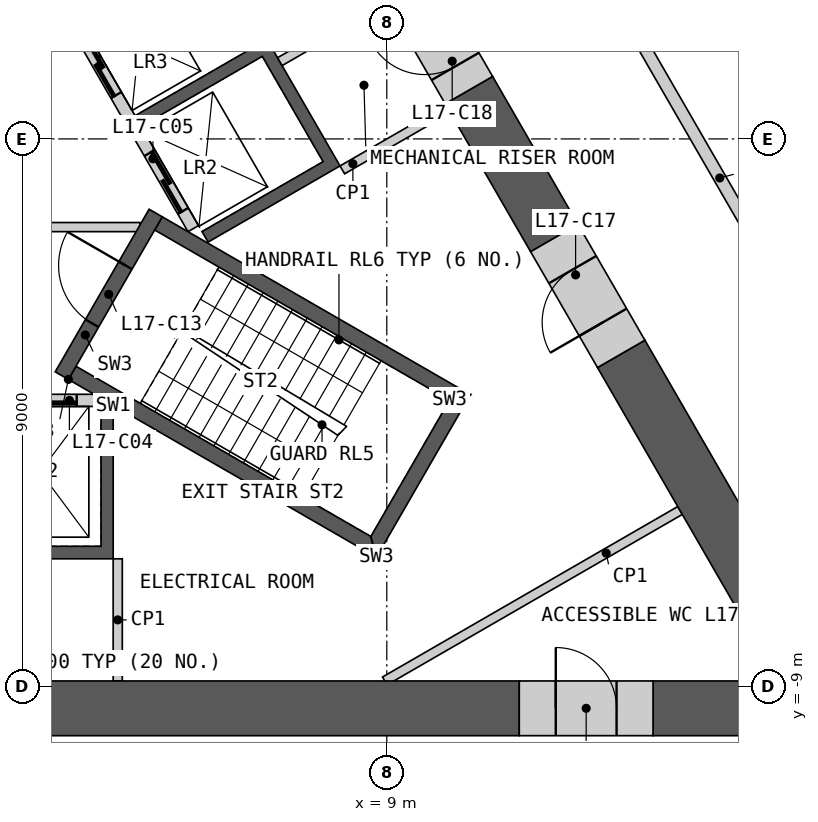
"""IFC4 building model, lengths in metres.
Left out: names, types, materials, properties, quantities, classifications, styles, units other than length and angle.
Written with IfcOpenShell. Run it as: python <this file> out.ifc"""

import sys

from ifc_helpers import new_model, si_unit, direction, frame, frame_2d, origin, place, context, subcontext, project, spatial, polyline, rectangle, outline, extrude, element, fill, save


model = new_model("IFC4")
c1 = context("Model", 3, precision=1e-05, world=origin(), true_north=direction((0.0, 1.0)))
c2 = subcontext(c1, "Body", "Model", "MODEL_VIEW")
j1 = project(units=[si_unit("LENGTHUNIT", "METRE"), si_unit("PLANEANGLEUNIT", "RADIAN")], contexts=[c1])
p1 = place(None, origin())
s1 = spatial("IfcSite", under=j1, at=p1, CompositionType="ELEMENT")
p2 = place(p1, origin())
s2 = spatial("IfcBuilding", under=s1, at=p2, CompositionType="ELEMENT")
p3 = place(p2, frame((0.0, 0.0, 80.4)))
s3 = spatial("IfcBuildingStorey", under=s2, at=p3, CompositionType="ELEMENT", Elevation=80.4)
p4 = place(p3, origin())
e1 = element("IfcWall", 1, at=p4, inside=s3, PredefinedType="SHEAR", context=c2, shape_type="SweptSolid", body=[
    extrude(outline(polyline([(4.5, -4.4), (4.5, -6.906), (-4.5, -6.906), (-4.5, -4.4), (-4.3, -4.4), (-4.3, -6.7), (-2.3, -6.7), (-2.3, -4.4), (-2.1, -4.4), (-2.1, -6.7), (-0.1, -6.7), (-0.1, -4.4), (0.1, -4.4), (0.1, -6.7), (2.1, -6.7), (2.1, -4.4), (2.3, -4.4), (2.3, -6.7), (4.3, -6.7), (4.3, -4.4), (4.5, -4.4)])), origin(), (0.0, 0.0, 1.0), 3.8),
])
p5 = place(p3, frame((-4.187, -4.3, 0.0), z_axis=(0.0, 0.0, 1.0), x_axis=(1.0, 0.0, 0.0)))
e2 = element("IfcWall", 2, at=p5, inside=s3, PredefinedType="SOLIDWALL", context=c2, shape_type="SweptSolid", body=[
    extrude(rectangle(XDim=8.373, YDim=0.2, at=frame_2d((4.187, 0.0))), origin(), (0.0, 0.0, 1.0), 3.8),
])
p6 = place(p5, frame((0.287, 0.0, 0.0)))
e3 = element("IfcOpeningElement", 3, at=p6, cuts=e2, PredefinedType="OPENING", context=c2, shape_type="SweptSolid", body=[
    extrude(rectangle(XDim=1.2, YDim=2.1, at=frame_2d((0.6, 1.05))), frame((0.0, 0.11, 0.0), z_axis=(0.0, -1.0, 0.0), x_axis=(1.0, 0.0, 0.0)), (0.0, 0.0, 1.0), 0.22),
])
p7 = place(p5, frame((2.387, 0.0, 0.0)))
e4 = element("IfcOpeningElement", 4, at=p7, cuts=e2, PredefinedType="OPENING", context=c2, shape_type="SweptSolid", body=[
    extrude(rectangle(XDim=1.4, YDim=2.1, at=frame_2d((0.7, 1.05))), frame((0.0, 0.11, 0.0), z_axis=(0.0, -1.0, 0.0), x_axis=(1.0, 0.0, 0.0)), (0.0, 0.0, 1.0), 0.22),
])
p8 = place(p5, frame((4.737, 0.0, 0.0)))
e5 = element("IfcOpeningElement", 5, at=p8, cuts=e2, PredefinedType="OPENING", context=c2, shape_type="SweptSolid", body=[
    extrude(rectangle(XDim=1.1, YDim=2.1, at=frame_2d((0.55, 1.05))), frame((0.0, 0.11, 0.0), z_axis=(0.0, -1.0, 0.0), x_axis=(1.0, 0.0, 0.0)), (0.0, 0.0, 1.0), 0.22),
])
p9 = place(p5, frame((6.887, 0.0, 0.0)))
e6 = element("IfcOpeningElement", 6, at=p9, cuts=e2, PredefinedType="OPENING", context=c2, shape_type="SweptSolid", body=[
    extrude(rectangle(XDim=1.2, YDim=2.1, at=frame_2d((0.6, 1.05))), frame((0.0, 0.11, 0.0), z_axis=(0.0, -1.0, 0.0), x_axis=(1.0, 0.0, 0.0)), (0.0, 0.0, 1.0), 0.22),
])
p10 = place(p3, origin())
e7 = element("IfcWall", 7, at=p10, inside=s3, PredefinedType="SHEAR", context=c2, shape_type="SweptSolid", body=[
    extrude(outline(polyline([(2.66, 4.192), (4.831, 5.445), (8.231, -0.444), (6.061, -1.697), (5.96, -1.524), (7.952, -0.374), (6.952, 1.358), (4.96, 0.208), (4.861, 0.381), (6.852, 1.531), (5.852, 3.263), (3.861, 2.113), (3.76, 2.287), (5.752, 3.437), (4.752, 5.169), (2.76, 4.019), (2.66, 4.192)])), origin(), (0.0, 0.0, 1.0), 3.8),
])
p11 = place(p3, frame((5.817, -1.476, 0.0), z_axis=(0.0, 0.0, 1.0), x_axis=(-0.500002616675, 0.866023893041, 0.0)))
e8 = element("IfcWall", 8, at=p11, inside=s3, PredefinedType="SOLIDWALL", context=c2, shape_type="SweptSolid", body=[
    extrude(rectangle(XDim=8.373, YDim=0.2, at=frame_2d((4.187, 0.0))), origin(), (0.0, 0.0, 1.0), 3.8),
])
p12 = place(p11, frame((0.337, 0.0, 0.0)))
e9 = element("IfcOpeningElement", 9, at=p12, cuts=e8, PredefinedType="OPENING", context=c2, shape_type="SweptSolid", body=[
    extrude(rectangle(XDim=1.1, YDim=2.1, at=frame_2d((0.55, 1.05))), frame((0.0, 0.11, 0.0), z_axis=(0.0, -1.0, 0.0), x_axis=(1.0, 0.0, 0.0)), (0.0, 0.0, 1.0), 0.22),
])
p13 = place(p11, frame((2.537, 0.0, 0.0)))
e10 = element("IfcOpeningElement", 10, at=p13, cuts=e8, PredefinedType="OPENING", context=c2, shape_type="SweptSolid", body=[
    extrude(rectangle(XDim=1.1, YDim=2.1, at=frame_2d((0.55, 1.05))), frame((0.0, 0.11, 0.0), z_axis=(0.0, -1.0, 0.0), x_axis=(1.0, 0.0, 0.0)), (0.0, 0.0, 1.0), 0.22),
])
p14 = place(p11, frame((4.737, 0.0, 0.0)))
e11 = element("IfcOpeningElement", 11, at=p14, cuts=e8, PredefinedType="OPENING", context=c2, shape_type="SweptSolid", body=[
    extrude(rectangle(XDim=1.1, YDim=2.1, at=frame_2d((0.55, 1.05))), frame((0.0, 0.11, 0.0), z_axis=(0.0, -1.0, 0.0), x_axis=(1.0, 0.0, 0.0)), (0.0, 0.0, 1.0), 0.22),
])
p15 = place(p11, frame((7.037, 0.0, 0.0)))
e12 = element("IfcOpeningElement", 12, at=p15, cuts=e8, PredefinedType="OPENING", context=c2, shape_type="SweptSolid", body=[
    extrude(rectangle(XDim=0.9, YDim=2.1, at=frame_2d((0.45, 1.05))), frame((0.0, 0.11, 0.0), z_axis=(0.0, -1.0, 0.0), x_axis=(1.0, 0.0, 0.0)), (0.0, 0.0, 1.0), 0.22),
])
p16 = place(p3, frame((-4.941, -1.45, 0.0), z_axis=(0.0, 0.0, 1.0), x_axis=(1.0, 0.0, 0.0)))
e13 = element("IfcWall", 13, at=p16, inside=s3, PredefinedType="PARTITIONING", context=c2, shape_type="SweptSolid", body=[
    extrude(rectangle(XDim=9.882, YDim=0.15, at=frame_2d((4.941, 0.0))), origin(), (0.0, 0.0, 1.0), 3.8),
])
p17 = place(p16, frame((4.391, 0.0, 0.0)))
e14 = element("IfcOpeningElement", 14, at=p17, cuts=e13, PredefinedType="OPENING", context=c2, shape_type="SweptSolid", body=[
    extrude(rectangle(XDim=1.1, YDim=2.1, at=frame_2d((0.55, 1.05))), frame((0.0, 0.085, 0.0), z_axis=(0.0, -1.0, 0.0), x_axis=(1.0, 0.0, 0.0)), (0.0, 0.0, 1.0), 0.17),
])
p18 = place(p3, origin())
e15 = element("IfcWall", 15, at=p18, inside=s3, PredefinedType="SHEAR", context=c2, shape_type="SweptSolid", body=[
    extrude(outline(polyline([(3.763, -3.956), (8.83, -6.881), (8.738, -6.539), (3.888, -3.739), (3.763, -3.956)])), origin(), (0.0, 0.0, 1.0), 3.8),
])
p19 = place(p3, origin())
e16 = element("IfcWall", 16, at=p19, inside=s3, PredefinedType="SHEAR", context=c2, shape_type="SweptSolid", body=[
    extrude(outline(polyline([(8.83, -6.881), (10.374, -4.206), (10.032, -4.298), (8.738, -6.539), (8.83, -6.881)])), origin(), (0.0, 0.0, 1.0), 3.8),
])
p20 = place(p3, origin())
e17 = element("IfcWall", 17, at=p20, inside=s3, PredefinedType="SHEAR", context=c2, shape_type="SweptSolid", body=[
    extrude(outline(polyline([(10.032, -4.298), (10.374, -4.206), (5.307, -1.281), (5.182, -1.498), (10.032, -4.298)])), origin(), (0.0, 0.0, 1.0), 3.8),
])
p21 = place(p3, frame((3.655, -3.893, 0.0), z_axis=(0.0, 0.0, 1.0), x_axis=(0.499982516597, 0.866035497597, 0.0)))
e18 = element("IfcWall", 18, at=p21, inside=s3, PredefinedType="SHEAR", context=c2, shape_type="SweptSolid", body=[
    extrude(rectangle(XDim=3.088, YDim=0.25, at=frame_2d((1.544, 0.0))), origin(), (0.0, 0.0, 1.0), 3.8),
])
p22 = place(p21, frame((0.994, 0.0, 0.0)))
e19 = element("IfcOpeningElement", 19, at=p22, cuts=e18, PredefinedType="OPENING", context=c2, shape_type="SweptSolid", body=[
    extrude(rectangle(XDim=1.1, YDim=2.1, at=frame_2d((0.55, 1.05))), frame((0.0, 0.135, 0.0), z_axis=(0.0, -1.0, 0.0), x_axis=(1.0, 0.0, 0.0)), (0.0, 0.0, 1.0), 0.27),
])
p23 = place(p3, frame((8.268, -0.509, 0.0), z_axis=(0.0, 0.0, 1.0), x_axis=(0.866035824272, 0.499981950752, 0.0)))
e20 = element("IfcWall", 20, at=p23, inside=s3, PredefinedType="PARTITIONING", context=c2, shape_type="SweptSolid", body=[
    extrude(rectangle(XDim=2.009, YDim=0.15, at=frame_2d((1.004, 0.0))), origin(), (0.0, 0.0, 1.0), 3.8),
])
p24 = place(p3, frame((4.575, -6.906, 0.0), z_axis=(0.0, 0.0, 1.0), x_axis=(0.0, -1.0, 0.0)))
e21 = element("IfcWall", 21, at=p24, inside=s3, PredefinedType="PARTITIONING", context=c2, shape_type="SweptSolid", body=[
    extrude(rectangle(XDim=2.009, YDim=0.15, at=frame_2d((1.004, 0.0))), origin(), (0.0, 0.0, 1.0), 3.8),
])
p25 = place(p3, frame((13.823, -6.111, 0.0), z_axis=(0.0, 0.0, 1.0), x_axis=(-0.866026802741, -0.499997576928, 0.0)))
e22 = element("IfcWall", 22, at=p25, inside=s3, PredefinedType="PARTITIONING", context=c2, shape_type="SweptSolid", body=[
    extrude(rectangle(XDim=5.607, YDim=0.15, at=frame_2d((2.804, 0.0))), origin(), (0.0, 0.0, 1.0), 3.8),
])
p26 = place(p3, frame((8.981, 2.275, 0.0), z_axis=(0.0, 0.0, 1.0), x_axis=(-0.866013584312, -0.500020471368, 0.0)))
e23 = element("IfcWall", 23, at=p26, inside=s3, PredefinedType="PARTITIONING", context=c2, shape_type="SweptSolid", body=[
    extrude(rectangle(XDim=2.009, YDim=0.15, at=frame_2d((1.005, 0.0))), origin(), (0.0, 0.0, 1.0), 3.8),
])
p27 = place(p3, frame((-4.371, -9.365, 0.0), z_axis=(0.0, 0.0, 1.0), x_axis=(1.0, 0.0, 0.0)))
e24 = element("IfcWall", 24, at=p27, inside=s3, PredefinedType="SHEAR", context=c2, shape_type="SweptSolid", body=[
    extrude(rectangle(XDim=15.55, YDim=0.9, at=frame_2d((7.775, 0.0))), origin(), (0.0, 0.0, 1.0), 3.8),
])
p28 = place(p3, frame((13.379, -9.365, 0.0), z_axis=(0.0, 0.0, 1.0), x_axis=(1.0, 0.0, 0.0)))
e25 = element("IfcWall", 25, at=p28, inside=s3, PredefinedType="SHEAR", context=c2, shape_type="SweptSolid", body=[
    extrude(rectangle(XDim=2.062, YDim=0.9, at=frame_2d((1.031, 0.0))), origin(), (0.0, 0.0, 1.0), 3.8),
])
p29 = place(p3, frame((15.831, -8.69, 0.0), z_axis=(0.0, 0.0, 1.0), x_axis=(-0.499999419053, 0.866025739194, 0.0)))
e26 = element("IfcWall", 26, at=p29, inside=s3, PredefinedType="SHEAR", context=c2, shape_type="SweptSolid", body=[
    extrude(rectangle(XDim=5.952, YDim=0.9, at=frame_2d((2.976, 0.0))), origin(), (0.0, 0.0, 1.0), 3.8),
])
p30 = place(p3, frame((11.755, -1.63, 0.0), z_axis=(0.0, 0.0, 1.0), x_axis=(-0.499943114462, 0.866058244174, 0.0)))
e27 = element("IfcWall", 27, at=p30, inside=s3, PredefinedType="SHEAR", context=c2, shape_type="SweptSolid", body=[
    extrude(rectangle(XDim=2.809, YDim=0.9, at=frame_2d((1.405, 0.0))), origin(), (0.0, 0.0, 1.0), 3.8),
])
p31 = place(p3, frame((11.179, -9.365, 0.0), z_axis=(0.0, 0.0, 1.0), x_axis=(1.0, 0.0, 0.0)))
e28 = element("IfcWall", 28, at=p31, inside=s3, PredefinedType="SHEAR", context=c2, shape_type="SweptSolid", body=[
    extrude(rectangle(XDim=2.2, YDim=0.9, at=frame_2d((1.1, 0.0))), origin(), (0.0, 0.0, 1.0), 3.8),
])
p32 = place(p31, frame((0.6, 0.0, 0.0)))
e29 = element("IfcOpeningElement", 29, at=p32, cuts=e28, PredefinedType="OPENING", context=c2, shape_type="SweptSolid", body=[
    extrude(rectangle(XDim=1.0, YDim=2.1, at=frame_2d((0.5, 1.05))), frame((0.0, 0.46, 0.0), z_axis=(0.0, -1.0, 0.0), x_axis=(1.0, 0.0, 0.0)), (0.0, 0.0, 1.0), 0.92),
])
p33 = place(p3, frame((12.855, -3.536, 0.0), z_axis=(0.0, 0.0, 1.0), x_axis=(-0.50002983664, 0.866008176907, 0.0)))
e30 = element("IfcWall", 30, at=p33, inside=s3, PredefinedType="SHEAR", context=c2, shape_type="SweptSolid", body=[
    extrude(rectangle(XDim=2.2, YDim=0.9, at=frame_2d((1.1, 0.0))), origin(), (0.0, 0.0, 1.0), 3.8),
])
p34 = place(p33, frame((0.6, 0.0, 0.0)))
e31 = element("IfcOpeningElement", 31, at=p34, cuts=e30, PredefinedType="OPENING", context=c2, shape_type="SweptSolid", body=[
    extrude(rectangle(XDim=1.0, YDim=2.1, at=frame_2d((0.5, 1.05))), frame((0.0, 0.46, 0.0), z_axis=(0.0, -1.0, 0.0), x_axis=(1.0, 0.0, 0.0)), (0.0, 0.0, 1.0), 0.92),
])
p35 = place(p3, frame((10.35, 0.803, 0.0), z_axis=(0.0, 0.0, 1.0), x_axis=(-0.500081290722, 0.865978465477, 0.0)))
e32 = element("IfcWall", 32, at=p35, inside=s3, PredefinedType="SHEAR", context=c2, shape_type="SweptSolid", body=[
    extrude(rectangle(XDim=1.865, YDim=0.9, at=frame_2d((0.933, 0.0))), origin(), (0.0, 0.0, 1.0), 3.8),
])
p36 = place(p35, frame((0.45, 0.0, 0.0)))
e33 = element("IfcOpeningElement", 33, at=p36, cuts=e32, PredefinedType="OPENING", context=c2, shape_type="SweptSolid", body=[
    extrude(rectangle(XDim=1.0, YDim=2.1, at=frame_2d((0.5, 1.05))), frame((0.0, 0.46, 0.0), z_axis=(0.0, -1.0, 0.0), x_axis=(1.0, 0.0, 0.0)), (0.0, 0.0, 1.0), 0.92),
])
p37 = place(p3, frame((10.719, 5.865, 0.0), z_axis=(0.0, 0.0, 1.0), x_axis=(0.49999175339, -0.866030164915, 0.0)))
e34 = element("IfcWall", 34, at=p37, inside=s3, PredefinedType="PARTITIONING", context=c2, shape_type="SweptSolid", body=[
    extrude(rectangle(XDim=10.019, YDim=0.2, at=frame_2d((5.009, 0.0))), origin(), (0.0, 0.0, 1.0), 3.8),
])
p38 = place(p37, frame((1.854, 0.0, 0.0)))
e35 = element("IfcOpeningElement", 35, at=p38, cuts=e34, PredefinedType="OPENING", context=c2, shape_type="SweptSolid", body=[
    extrude(rectangle(XDim=1.0, YDim=2.1, at=frame_2d((0.5, 1.05))), frame((0.0, 0.11, 0.0), z_axis=(0.0, -1.0, 0.0), x_axis=(1.0, 0.0, 0.0)), (0.0, 0.0, 1.0), 0.22),
])
p39 = place(p9, origin())
e36 = element("IfcDoor", 36, at=p39, inside=s3, OperationType="SLIDING_TO_LEFT", PredefinedType="DOOR", context=c2, shape_type="SweptSolid", body=[
    extrude(rectangle(XDim=1.2, YDim=2.1, at=frame_2d((0.6, 1.05))), frame((0.0, 0.025, 0.0), z_axis=(0.0, -1.0, 0.0), x_axis=(1.0, 0.0, 0.0)), (0.0, 0.0, 1.0), 0.05),
])
fill(e6, e36)
p40 = place(p12, origin())
e37 = element("IfcDoor", 37, at=p40, inside=s3, OperationType="SLIDING_TO_LEFT", PredefinedType="DOOR", context=c2, shape_type="SweptSolid", body=[
    extrude(rectangle(XDim=1.1, YDim=2.1, at=frame_2d((0.55, 1.05))), frame((0.0, 0.025, 0.0), z_axis=(0.0, -1.0, 0.0), x_axis=(1.0, 0.0, 0.0)), (0.0, 0.0, 1.0), 0.05),
])
fill(e9, e37)
p41 = place(p13, origin())
e38 = element("IfcDoor", 38, at=p41, inside=s3, OperationType="SLIDING_TO_LEFT", PredefinedType="DOOR", context=c2, shape_type="SweptSolid", body=[
    extrude(rectangle(XDim=1.1, YDim=2.1, at=frame_2d((0.55, 1.05))), frame((0.0, 0.025, 0.0), z_axis=(0.0, -1.0, 0.0), x_axis=(1.0, 0.0, 0.0)), (0.0, 0.0, 1.0), 0.05),
])
fill(e10, e38)
p42 = place(p22, origin())
e39 = element("IfcDoor", 39, at=p42, inside=s3, OperationType="SINGLE_SWING_RIGHT", PredefinedType="DOOR", context=c2, shape_type="SweptSolid", body=[
    extrude(rectangle(XDim=1.1, YDim=2.1, at=frame_2d((0.55, 1.05))), frame((0.0, 0.025, 0.0), z_axis=(0.0, -1.0, 0.0), x_axis=(1.0, 0.0, 0.0)), (0.0, 0.0, 1.0), 0.05),
])
fill(e19, e39)
p43 = place(p32, origin())
e40 = element("IfcDoor", 40, at=p43, inside=s3, OperationType="SINGLE_SWING_LEFT", PredefinedType="DOOR", context=c2, shape_type="SweptSolid", body=[
    extrude(rectangle(XDim=1.0, YDim=2.1, at=frame_2d((0.5, 1.05))), frame((0.0, 0.205, 0.0), z_axis=(0.0, -1.0, 0.0), x_axis=(1.0, 0.0, 0.0)), (0.0, 0.0, 1.0), 0.05),
])
fill(e29, e40)
p44 = place(p34, origin())
e41 = element("IfcDoor", 41, at=p44, inside=s3, OperationType="SINGLE_SWING_LEFT", PredefinedType="DOOR", context=c2, shape_type="SweptSolid", body=[
    extrude(rectangle(XDim=1.0, YDim=2.1, at=frame_2d((0.5, 1.05))), frame((0.0, 0.205, 0.0), z_axis=(0.0, -1.0, 0.0), x_axis=(1.0, 0.0, 0.0)), (0.0, 0.0, 1.0), 0.05),
])
fill(e31, e41)
p45 = place(p36, origin())
e42 = element("IfcDoor", 42, at=p45, inside=s3, OperationType="SINGLE_SWING_RIGHT", PredefinedType="DOOR", context=c2, shape_type="SweptSolid", body=[
    extrude(rectangle(XDim=1.0, YDim=2.1, at=frame_2d((0.5, 1.05))), frame((0.0, 0.205, 0.0), z_axis=(0.0, -1.0, 0.0), x_axis=(1.0, 0.0, 0.0)), (0.0, 0.0, 1.0), 0.05),
])
fill(e33, e42)
save(model, sys.argv[1])
